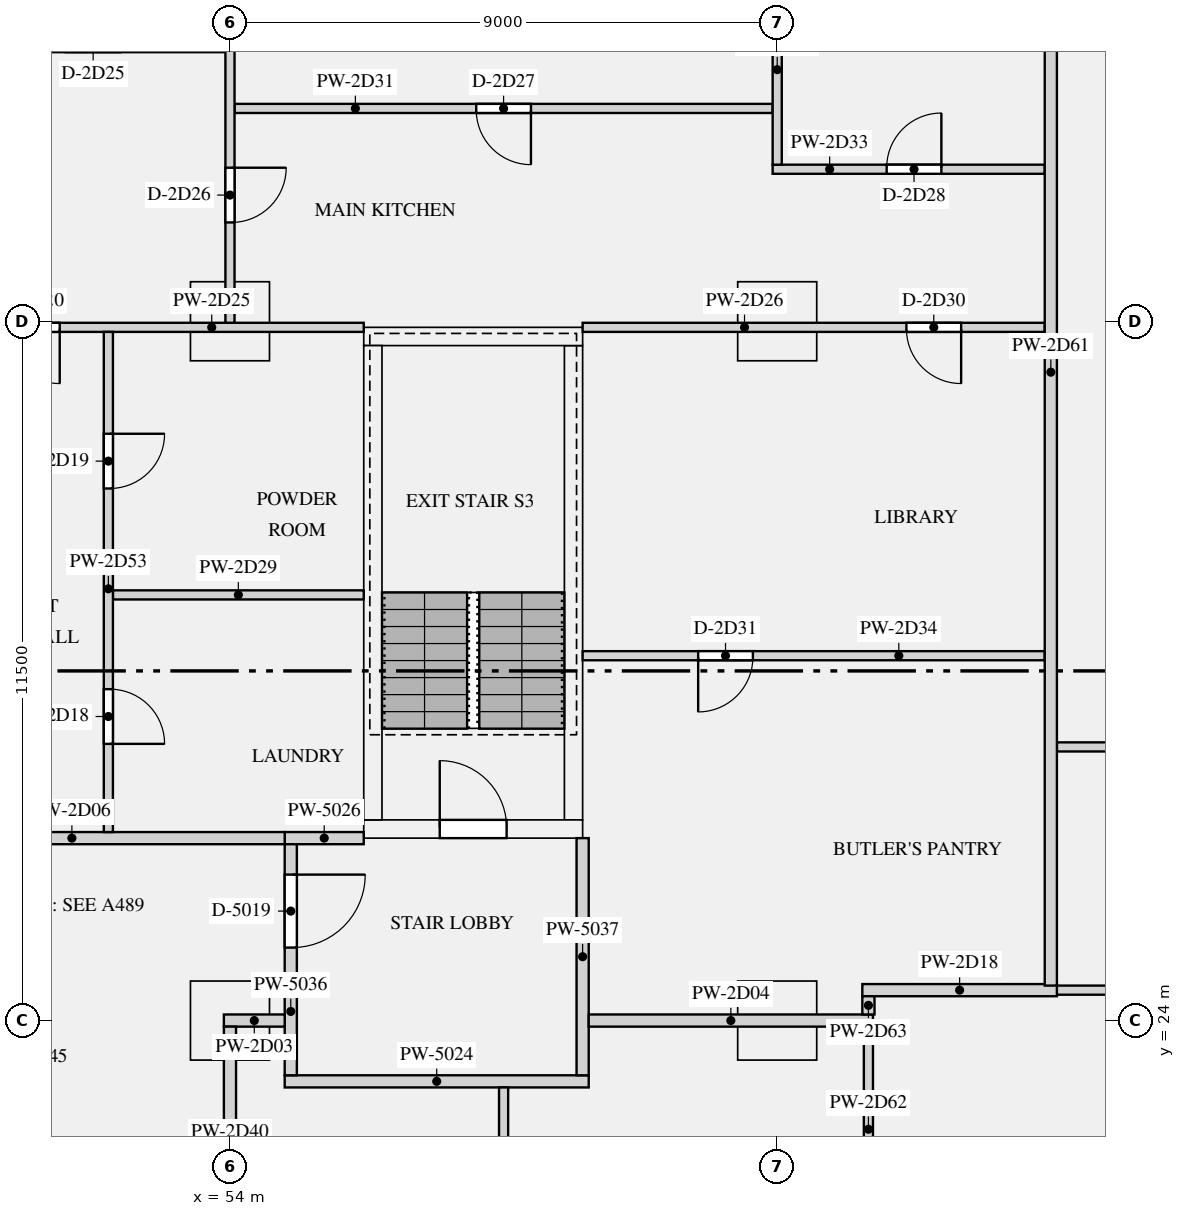
"""IFC4 building model, lengths in metres.
Left out: names, types, materials, properties, quantities, classifications, styles, units other than length and angle.
Written with IfcOpenShell. Run it as: python <this file> out.ifc"""

import sys

from ifc_helpers import new_model, si_unit, direction, frame, frame_2d, origin, origin_2d, place, context, subcontext, project, spatial, rectangle, extrude, element, fill, save


model = new_model("IFC4")
c1 = context("Model", 3, precision=1e-05, world=origin(), true_north=direction((0.0, 1.0)))
c2 = subcontext(c1, "Body", "Model", "MODEL_VIEW")
j1 = project(units=[si_unit("LENGTHUNIT", "METRE"), si_unit("PLANEANGLEUNIT", "RADIAN")], contexts=[c1])
p1 = place(None, origin())
s1 = spatial("IfcSite", under=j1, at=p1, CompositionType="ELEMENT")
p2 = place(p1, origin())
s2 = spatial("IfcBuilding", under=s1, at=p2, CompositionType="ELEMENT")
p3 = place(p2, frame((0.0, 0.0, 111.9)))
s3 = spatial("IfcBuildingStorey", under=s2, at=p3, CompositionType="ELEMENT", Elevation=111.9)
for number, where, z_axis, x_axis in (
    (1, (54.0, 24.0, 0.0), (0.0, 0.0, 1.0), (1.0, 0.0, 0.0)),
    (2, (63.0, 24.0, 0.0), (0.0, 0.0, 1.0), (1.0, 0.0, 0.0)),
    (3, (54.0, 35.5, 0.0), (0.0, 0.0, 1.0), (1.0, 0.0, 0.0)),
    (4, (63.0, 35.5, 0.0), (0.0, 0.0, 1.0), (1.0, 0.0, 0.0)),
):
    element("IfcColumn", number, at=place(p3, frame(where, z_axis=z_axis, x_axis=x_axis)), inside=s3, PredefinedType="COLUMN", context=c2, shape_type="SweptSolid", body=[
        extrude(rectangle(XDim=1.3, YDim=1.3, at=origin_2d()), origin(), (0.0, 0.0, 1.0), 3.15),
    ])
p4 = place(p3, frame((56.2, 27.15, 0.0), z_axis=(0.0, 0.0, 1.0), x_axis=(1.0, 0.0, 0.0)))
e5 = element("IfcWall", 5, at=p4, inside=s3, PredefinedType="SHEAR", context=c2, shape_type="SweptSolid", body=[
    extrude(rectangle(XDim=3.6, YDim=0.3, at=frame_2d((1.8, 0.0))), origin(), (0.0, 0.0, 1.0), 3.15),
])
p5 = place(p4, frame((1.25, 0.0, 0.0)))
e6 = element("IfcOpeningElement", 6, at=p5, cuts=e5, PredefinedType="OPENING", context=c2, shape_type="SweptSolid", body=[
    extrude(rectangle(XDim=1.1, YDim=2.1, at=frame_2d((0.55, 1.05))), frame((0.0, 0.16, 0.0), z_axis=(0.0, -1.0, 0.0), x_axis=(1.0, 0.0, 0.0)), (0.0, 0.0, 1.0), 0.32),
])
p6 = place(p3, frame((56.2, 35.25, 0.0), z_axis=(0.0, 0.0, 1.0), x_axis=(1.0, 0.0, 0.0)))
e7 = element("IfcWall", 7, at=p6, inside=s3, PredefinedType="SHEAR", context=c2, shape_type="SweptSolid", body=[
    extrude(rectangle(XDim=3.6, YDim=0.3, at=frame_2d((1.8, 0.0))), origin(), (0.0, 0.0, 1.0), 3.15),
])
for number, where, z_axis, x_axis in (
    (8, (56.35, 27.3, 0.0), (0.0, 0.0, 1.0), (0.0, 1.0, 0.0)),
    (9, (59.65, 27.3, 0.0), (0.0, 0.0, 1.0), (0.0, 1.0, 0.0)),
):
    element("IfcWall", number, at=place(p3, frame(where, z_axis=z_axis, x_axis=x_axis)), inside=s3, PredefinedType="SHEAR", context=c2, shape_type="SweptSolid", body=[
        extrude(rectangle(XDim=7.8, YDim=0.3, at=frame_2d((3.9, 0.0))), origin(), (0.0, 0.0, 1.0), 3.15),
    ])
p7 = place(p3, frame((54.9, 23.0, 0.0), z_axis=(0.0, 0.0, 1.0), x_axis=(1.0, 0.0, 0.0)))
e10 = element("IfcWall", 10, at=p7, inside=s3, PredefinedType="PARTITIONING", context=c2, shape_type="SweptSolid", body=[
    extrude(rectangle(XDim=5.0, YDim=0.2, at=frame_2d((2.5, 0.0))), origin(), (0.0, 0.0, 1.0), 2.83),
])
p8 = place(p3, frame((54.9, 27.0, 0.0), z_axis=(0.0, 0.0, 1.0), x_axis=(1.0, 0.0, 0.0)))
e11 = element("IfcWall", 11, at=p8, inside=s3, PredefinedType="PARTITIONING", context=c2, shape_type="SweptSolid", body=[
    extrude(rectangle(XDim=1.3, YDim=0.2, at=frame_2d((0.65, 0.0))), origin(), (0.0, 0.0, 1.0), 2.83),
])
p9 = place(p3, frame((55.0, 23.1, 0.0), z_axis=(0.0, 0.0, 1.0), x_axis=(0.0, 1.0, 0.0)))
e12 = element("IfcWall", 12, at=p9, inside=s3, PredefinedType="PARTITIONING", context=c2, shape_type="SweptSolid", body=[
    extrude(rectangle(XDim=3.8, YDim=0.2, at=frame_2d((1.9, 0.0))), origin(), (0.0, 0.0, 1.0), 2.83),
])
p10 = place(p9, frame((2.1, 0.0, 0.0)))
e13 = element("IfcOpeningElement", 13, at=p10, cuts=e12, PredefinedType="OPENING", context=c2, shape_type="SweptSolid", body=[
    extrude(rectangle(XDim=1.2, YDim=2.1, at=frame_2d((0.6, 1.05))), frame((0.0, 0.11, 0.0), z_axis=(0.0, -1.0, 0.0), x_axis=(1.0, 0.0, 0.0)), (0.0, 0.0, 1.0), 0.22),
])
p11 = place(p3, frame((59.8, 23.1, 0.0), z_axis=(0.0, 0.0, 1.0), x_axis=(0.0, 1.0, 0.0)))
e14 = element("IfcWall", 14, at=p11, inside=s3, PredefinedType="PARTITIONING", context=c2, shape_type="SweptSolid", body=[
    extrude(rectangle(XDim=3.9, YDim=0.2, at=frame_2d((1.95, 0.0))), origin(), (0.0, 0.0, 1.0), 2.83),
])
p12 = place(p3, frame((53.9, 24.0, 0.0), z_axis=(0.0, 0.0, 1.0), x_axis=(1.0, 0.0, 0.0)))
e15 = element("IfcWall", 15, at=p12, inside=s3, PredefinedType="PARTITIONING", context=c2, shape_type="SweptSolid", body=[
    extrude(rectangle(XDim=1.0, YDim=0.2, at=frame_2d((0.5, 0.0))), origin(), (0.0, 0.0, 1.0), 2.83),
])
p13 = place(p3, frame((59.9, 24.0, 0.0), z_axis=(0.0, 0.0, 1.0), x_axis=(1.0, 0.0, 0.0)))
e16 = element("IfcWall", 16, at=p13, inside=s3, PredefinedType="PARTITIONING", context=c2, shape_type="SweptSolid", body=[
    extrude(rectangle(XDim=4.675, YDim=0.2, at=frame_2d((2.337, 0.0))), origin(), (0.0, 0.0, 1.0), 2.83),
])
p14 = place(p3, frame((47.9, 27.0, 0.0), z_axis=(0.0, 0.0, 1.0), x_axis=(1.0, 0.0, 0.0)))
e17 = element("IfcWall", 17, at=p14, inside=s3, PredefinedType="PARTITIONING", context=c2, shape_type="SweptSolid", body=[
    extrude(rectangle(XDim=7.0, YDim=0.2, at=frame_2d((3.5, 0.0))), origin(), (0.0, 0.0, 1.0), 2.83),
])
p15 = place(p3, frame((67.4, 24.5, 0.0), z_axis=(0.0, 0.0, 1.0), x_axis=(1.0, 0.0, 0.0)))
e18 = element("IfcWall", 18, at=p15, inside=s3, PredefinedType="PARTITIONING", context=c2, shape_type="SweptSolid", body=[
    extrude(rectangle(XDim=5.85, YDim=0.15, at=frame_2d((2.925, 0.0))), origin(), (0.0, 0.0, 1.0), 2.83),
])
p16 = place(p15, frame((1.275, 0.0, 0.0)))
e19 = element("IfcOpeningElement", 19, at=p16, cuts=e18, PredefinedType="OPENING", context=c2, shape_type="SweptSolid", body=[
    extrude(rectangle(XDim=1.5, YDim=2.1, at=frame_2d((0.75, 1.05))), frame((0.0, 0.085, 0.0), z_axis=(0.0, -1.0, 0.0), x_axis=(1.0, 0.0, 0.0)), (0.0, 0.0, 1.0), 0.17),
])
p17 = place(p3, frame((64.4, 24.5, 0.0), z_axis=(0.0, 0.0, 1.0), x_axis=(1.0, 0.0, 0.0)))
e20 = element("IfcWall", 20, at=p17, inside=s3, PredefinedType="PARTITIONING", context=c2, shape_type="SweptSolid", body=[
    extrude(rectangle(XDim=3.2, YDim=0.2, at=frame_2d((1.6, 0.0))), origin(), (0.0, 0.0, 1.0), 2.83),
])
p18 = place(p3, frame((67.6, 28.5, 0.0), z_axis=(0.0, 0.0, 1.0), x_axis=(1.0, 0.0, 0.0)))
e21 = element("IfcWall", 21, at=p18, inside=s3, PredefinedType="PARTITIONING", context=c2, shape_type="SweptSolid", body=[
    extrude(rectangle(XDim=5.65, YDim=0.15, at=frame_2d((2.825, 0.0))), origin(), (0.0, 0.0, 1.0), 2.83),
])
p19 = place(p18, frame((1.7, 0.0, 0.0)))
e22 = element("IfcOpeningElement", 22, at=p19, cuts=e21, PredefinedType="OPENING", context=c2, shape_type="SweptSolid", body=[
    extrude(rectangle(XDim=0.9, YDim=2.1, at=frame_2d((0.45, 1.05))), frame((0.0, 0.085, 0.0), z_axis=(0.0, -1.0, 0.0), x_axis=(1.0, 0.0, 0.0)), (0.0, 0.0, 1.0), 0.17),
])
p20 = place(p3, frame((48.1, 35.4, 0.0), z_axis=(0.0, 0.0, 1.0), x_axis=(1.0, 0.0, 0.0)))
e23 = element("IfcWall", 23, at=p20, inside=s3, PredefinedType="PARTITIONING", context=c2, shape_type="SweptSolid", body=[
    extrude(rectangle(XDim=8.1, YDim=0.15, at=frame_2d((4.05, 0.0))), origin(), (0.0, 0.0, 1.0), 2.83),
])
p21 = place(p20, frame((2.2, 0.0, 0.0)))
e24 = element("IfcOpeningElement", 24, at=p21, cuts=e23, PredefinedType="OPENING", context=c2, shape_type="SweptSolid", body=[
    extrude(rectangle(XDim=0.9, YDim=2.1, at=frame_2d((0.45, 1.05))), frame((0.0, 0.085, 0.0), z_axis=(0.0, -1.0, 0.0), x_axis=(1.0, 0.0, 0.0)), (0.0, 0.0, 1.0), 0.17),
])
p22 = place(p3, frame((59.8, 35.4, 0.0), z_axis=(0.0, 0.0, 1.0), x_axis=(1.0, 0.0, 0.0)))
e25 = element("IfcWall", 25, at=p22, inside=s3, PredefinedType="PARTITIONING", context=c2, shape_type="SweptSolid", body=[
    extrude(rectangle(XDim=7.6, YDim=0.15, at=frame_2d((3.8, 0.0))), origin(), (0.0, 0.0, 1.0), 2.83),
])
p23 = place(p22, frame((5.325, 0.0, 0.0)))
e26 = element("IfcOpeningElement", 26, at=p23, cuts=e25, PredefinedType="OPENING", context=c2, shape_type="SweptSolid", body=[
    extrude(rectangle(XDim=0.9, YDim=2.1, at=frame_2d((0.45, 1.05))), frame((0.0, 0.085, 0.0), z_axis=(0.0, -1.0, 0.0), x_axis=(1.0, 0.0, 0.0)), (0.0, 0.0, 1.0), 0.17),
])
p24 = place(p3, frame((52.075, 31.0, 0.0), z_axis=(0.0, 0.0, 1.0), x_axis=(1.0, 0.0, 0.0)))
e27 = element("IfcWall", 27, at=p24, inside=s3, PredefinedType="PARTITIONING", context=c2, shape_type="SweptSolid", body=[
    extrude(rectangle(XDim=4.125, YDim=0.15, at=frame_2d((2.062, 0.0))), origin(), (0.0, 0.0, 1.0), 2.83),
])
p25 = place(p3, frame((54.075, 39.0, 0.0), z_axis=(0.0, 0.0, 1.0), x_axis=(1.0, 0.0, 0.0)))
e28 = element("IfcWall", 28, at=p25, inside=s3, PredefinedType="PARTITIONING", context=c2, shape_type="SweptSolid", body=[
    extrude(rectangle(XDim=8.85, YDim=0.15, at=frame_2d((4.425, 0.0))), origin(), (0.0, 0.0, 1.0), 2.83),
])
p26 = place(p25, frame((3.975, 0.0, 0.0)))
e29 = element("IfcOpeningElement", 29, at=p26, cuts=e28, PredefinedType="OPENING", context=c2, shape_type="SweptSolid", body=[
    extrude(rectangle(XDim=0.9, YDim=2.1, at=frame_2d((0.45, 1.05))), frame((0.0, 0.085, 0.0), z_axis=(0.0, -1.0, 0.0), x_axis=(1.0, 0.0, 0.0)), (0.0, 0.0, 1.0), 0.17),
])
p27 = place(p3, frame((62.925, 38.0, 0.0), z_axis=(0.0, 0.0, 1.0), x_axis=(1.0, 0.0, 0.0)))
e30 = element("IfcWall", 30, at=p27, inside=s3, PredefinedType="PARTITIONING", context=c2, shape_type="SweptSolid", body=[
    extrude(rectangle(XDim=4.475, YDim=0.15, at=frame_2d((2.237, 0.0))), origin(), (0.0, 0.0, 1.0), 2.83),
])
p28 = place(p27, frame((1.875, 0.0, 0.0)))
e31 = element("IfcOpeningElement", 31, at=p28, cuts=e30, PredefinedType="OPENING", context=c2, shape_type="SweptSolid", body=[
    extrude(rectangle(XDim=0.9, YDim=2.1, at=frame_2d((0.45, 1.05))), frame((0.0, 0.085, 0.0), z_axis=(0.0, -1.0, 0.0), x_axis=(1.0, 0.0, 0.0)), (0.0, 0.0, 1.0), 0.17),
])
p29 = place(p3, frame((59.8, 30.0, 0.0), z_axis=(0.0, 0.0, 1.0), x_axis=(1.0, 0.0, 0.0)))
e32 = element("IfcWall", 32, at=p29, inside=s3, PredefinedType="PARTITIONING", context=c2, shape_type="SweptSolid", body=[
    extrude(rectangle(XDim=7.6, YDim=0.15, at=frame_2d((3.8, 0.0))), origin(), (0.0, 0.0, 1.0), 2.83),
])
p30 = place(p29, frame((1.9, 0.0, 0.0)))
e33 = element("IfcOpeningElement", 33, at=p30, cuts=e32, PredefinedType="OPENING", context=c2, shape_type="SweptSolid", body=[
    extrude(rectangle(XDim=0.9, YDim=2.1, at=frame_2d((0.45, 1.05))), frame((0.0, 0.085, 0.0), z_axis=(0.0, -1.0, 0.0), x_axis=(1.0, 0.0, 0.0)), (0.0, 0.0, 1.0), 0.17),
])
p31 = place(p3, frame((54.0, 35.475, 0.0), z_axis=(0.0, 0.0, 1.0), x_axis=(0.0, 1.0, 0.0)))
e34 = element("IfcWall", 34, at=p31, inside=s3, PredefinedType="PARTITIONING", context=c2, shape_type="SweptSolid", body=[
    extrude(rectangle(XDim=9.275, YDim=0.15, at=frame_2d((4.637, 0.0))), origin(), (0.0, 0.0, 1.0), 2.83),
])
p32 = place(p31, frame((1.65, 0.0, 0.0)))
e35 = element("IfcOpeningElement", 35, at=p32, cuts=e34, PredefinedType="OPENING", context=c2, shape_type="SweptSolid", body=[
    extrude(rectangle(XDim=0.9, YDim=2.1, at=frame_2d((0.45, 1.05))), frame((0.0, 0.085, 0.0), z_axis=(0.0, -1.0, 0.0), x_axis=(1.0, 0.0, 0.0)), (0.0, 0.0, 1.0), 0.17),
])
p33 = place(p3, frame((54.0, 16.1, 0.0), z_axis=(0.0, 0.0, 1.0), x_axis=(0.0, 1.0, 0.0)))
e36 = element("IfcWall", 36, at=p33, inside=s3, PredefinedType="PARTITIONING", context=c2, shape_type="SweptSolid", body=[
    extrude(rectangle(XDim=7.8, YDim=0.2, at=frame_2d((3.9, 0.0))), origin(), (0.0, 0.0, 1.0), 2.83),
])
p34 = place(p33, frame((2.35, 0.0, 0.0)))
e37 = element("IfcOpeningElement", 37, at=p34, cuts=e36, PredefinedType="OPENING", context=c2, shape_type="SweptSolid", body=[
    extrude(rectangle(XDim=1.1, YDim=2.1, at=frame_2d((0.55, 1.05))), frame((0.0, 0.11, 0.0), z_axis=(0.0, -1.0, 0.0), x_axis=(1.0, 0.0, 0.0)), (0.0, 0.0, 1.0), 0.22),
])
p35 = place(p3, frame((52.0, 27.1, 0.0), z_axis=(0.0, 0.0, 1.0), x_axis=(0.0, 1.0, 0.0)))
e38 = element("IfcWall", 38, at=p35, inside=s3, PredefinedType="PARTITIONING", context=c2, shape_type="SweptSolid", body=[
    extrude(rectangle(XDim=8.225, YDim=0.15, at=frame_2d((4.112, 0.0))), origin(), (0.0, 0.0, 1.0), 2.83),
])
p36 = place(p35, frame((1.45, 0.0, 0.0)))
e39 = element("IfcOpeningElement", 39, at=p36, cuts=e38, PredefinedType="OPENING", context=c2, shape_type="SweptSolid", body=[
    extrude(rectangle(XDim=0.9, YDim=2.1, at=frame_2d((0.45, 1.05))), frame((0.0, 0.085, 0.0), z_axis=(0.0, -1.0, 0.0), x_axis=(1.0, 0.0, 0.0)), (0.0, 0.0, 1.0), 0.17),
])
p37 = place(p35, frame((5.65, 0.0, 0.0)))
e40 = element("IfcOpeningElement", 40, at=p37, cuts=e38, PredefinedType="OPENING", context=c2, shape_type="SweptSolid", body=[
    extrude(rectangle(XDim=0.9, YDim=2.1, at=frame_2d((0.45, 1.05))), frame((0.0, 0.085, 0.0), z_axis=(0.0, -1.0, 0.0), x_axis=(1.0, 0.0, 0.0)), (0.0, 0.0, 1.0), 0.17),
])
p38 = place(p3, frame((63.0, 38.075, 0.0), z_axis=(0.0, 0.0, 1.0), x_axis=(0.0, 1.0, 0.0)))
e41 = element("IfcWall", 41, at=p38, inside=s3, PredefinedType="PARTITIONING", context=c2, shape_type="SweptSolid", body=[
    extrude(rectangle(XDim=6.675, YDim=0.15, at=frame_2d((3.337, 0.0))), origin(), (0.0, 0.0, 1.0), 2.83),
])
p39 = place(p38, frame((3.125, 0.0, 0.0)))
e42 = element("IfcOpeningElement", 42, at=p39, cuts=e41, PredefinedType="OPENING", context=c2, shape_type="SweptSolid", body=[
    extrude(rectangle(XDim=1.5, YDim=2.1, at=frame_2d((0.75, 1.05))), frame((0.0, 0.085, 0.0), z_axis=(0.0, -1.0, 0.0), x_axis=(1.0, 0.0, 0.0)), (0.0, 0.0, 1.0), 0.17),
])
p40 = place(p3, frame((67.5, 24.575, 0.0), z_axis=(0.0, 0.0, 1.0), x_axis=(0.0, 1.0, 0.0)))
e43 = element("IfcWall", 43, at=p40, inside=s3, PredefinedType="PARTITIONING", context=c2, shape_type="SweptSolid", body=[
    extrude(rectangle(XDim=20.175, YDim=0.2, at=frame_2d((10.087, 0.0))), origin(), (0.0, 0.0, 1.0), 2.83),
])
p41 = place(p3, frame((64.5, 16.575, 0.0), z_axis=(0.0, 0.0, 1.0), x_axis=(0.0, 1.0, 0.0)))
e44 = element("IfcWall", 44, at=p41, inside=s3, PredefinedType="PARTITIONING", context=c2, shape_type="SweptSolid", body=[
    extrude(rectangle(XDim=7.325, YDim=0.15, at=frame_2d((3.663, 0.0))), origin(), (0.0, 0.0, 1.0), 2.83),
])
p42 = place(p41, frame((3.05, 0.0, 0.0)))
e45 = element("IfcOpeningElement", 45, at=p42, cuts=e44, PredefinedType="OPENING", context=c2, shape_type="SweptSolid", body=[
    extrude(rectangle(XDim=0.9, YDim=2.1, at=frame_2d((0.45, 1.05))), frame((0.0, 0.085, 0.0), z_axis=(0.0, -1.0, 0.0), x_axis=(1.0, 0.0, 0.0)), (0.0, 0.0, 1.0), 0.17),
])
p43 = place(p3, frame((64.5, 24.1, 0.0), z_axis=(0.0, 0.0, 1.0), x_axis=(0.0, 1.0, 0.0)))
e46 = element("IfcWall", 46, at=p43, inside=s3, PredefinedType="PARTITIONING", context=c2, shape_type="SweptSolid", body=[
    extrude(rectangle(XDim=0.3, YDim=0.2, at=frame_2d((0.15, 0.0))), origin(), (0.0, 0.0, 1.0), 2.83),
])
p44 = place(p3, frame((58.5, 16.575, 0.0), z_axis=(0.0, 0.0, 1.0), x_axis=(0.0, 1.0, 0.0)))
e47 = element("IfcWall", 47, at=p44, inside=s3, PredefinedType="PARTITIONING", context=c2, shape_type="SweptSolid", body=[
    extrude(rectangle(XDim=6.325, YDim=0.15, at=frame_2d((3.163, 0.0))), origin(), (0.0, 0.0, 1.0), 2.83),
])
p45 = place(p44, frame((2.75, 0.0, 0.0)))
e48 = element("IfcOpeningElement", 48, at=p45, cuts=e47, PredefinedType="OPENING", context=c2, shape_type="SweptSolid", body=[
    extrude(rectangle(XDim=0.9, YDim=2.1, at=frame_2d((0.45, 1.05))), frame((0.0, 0.085, 0.0), z_axis=(0.0, -1.0, 0.0), x_axis=(1.0, 0.0, 0.0)), (0.0, 0.0, 1.0), 0.17),
])
p46 = place(p5, origin())
e49 = element("IfcDoor", 49, at=p46, inside=s3, OperationType="SINGLE_SWING_LEFT", PredefinedType="DOOR", context=c2, shape_type="SweptSolid", body=[
    extrude(rectangle(XDim=1.1, YDim=2.1, at=frame_2d((0.55, 1.05))), frame((0.0, 0.025, 0.0), z_axis=(0.0, -1.0, 0.0), x_axis=(1.0, 0.0, 0.0)), (0.0, 0.0, 1.0), 0.05),
])
fill(e6, e49)
p47 = place(p10, frame((1.2, 0.0, 0.0), z_axis=(0.0, 0.0, 1.0), x_axis=(-1.0, 0.0, 0.0)))
e50 = element("IfcDoor", 50, at=p47, inside=s3, OperationType="SINGLE_SWING_LEFT", PredefinedType="DOOR", context=c2, shape_type="SweptSolid", body=[
    extrude(rectangle(XDim=1.2, YDim=2.1, at=frame_2d((0.6, 1.05))), frame((0.0, 0.025, 0.0), z_axis=(0.0, -1.0, 0.0), x_axis=(1.0, 0.0, 0.0)), (0.0, 0.0, 1.0), 0.05),
])
fill(e13, e50)
p48 = place(p36, frame((0.9, 0.0, 0.0), z_axis=(0.0, 0.0, 1.0), x_axis=(-1.0, 0.0, 0.0)))
e51 = element("IfcDoor", 51, at=p48, inside=s3, OperationType="SINGLE_SWING_RIGHT", PredefinedType="DOOR", context=c2, shape_type="SweptSolid", body=[
    extrude(rectangle(XDim=0.9, YDim=2.1, at=frame_2d((0.45, 1.05))), frame((0.0, 0.025, 0.0), z_axis=(0.0, -1.0, 0.0), x_axis=(1.0, 0.0, 0.0)), (0.0, 0.0, 1.0), 0.05),
])
fill(e39, e51)
p49 = place(p37, frame((0.9, 0.0, 0.0), z_axis=(0.0, 0.0, 1.0), x_axis=(-1.0, 0.0, 0.0)))
e52 = element("IfcDoor", 52, at=p49, inside=s3, OperationType="SINGLE_SWING_LEFT", PredefinedType="DOOR", context=c2, shape_type="SweptSolid", body=[
    extrude(rectangle(XDim=0.9, YDim=2.1, at=frame_2d((0.45, 1.05))), frame((0.0, 0.025, 0.0), z_axis=(0.0, -1.0, 0.0), x_axis=(1.0, 0.0, 0.0)), (0.0, 0.0, 1.0), 0.05),
])
fill(e40, e52)
p50 = place(p21, frame((0.9, 0.0, 0.0), z_axis=(0.0, 0.0, 1.0), x_axis=(-1.0, 0.0, 0.0)))
e53 = element("IfcDoor", 53, at=p50, inside=s3, OperationType="SINGLE_SWING_LEFT", PredefinedType="DOOR", context=c2, shape_type="SweptSolid", body=[
    extrude(rectangle(XDim=0.9, YDim=2.1, at=frame_2d((0.45, 1.05))), frame((0.0, 0.025, 0.0), z_axis=(0.0, -1.0, 0.0), x_axis=(1.0, 0.0, 0.0)), (0.0, 0.0, 1.0), 0.05),
])
fill(e24, e53)
p51 = place(p32, frame((0.9, 0.0, 0.0), z_axis=(0.0, 0.0, 1.0), x_axis=(-1.0, 0.0, 0.0)))
e54 = element("IfcDoor", 54, at=p51, inside=s3, OperationType="SINGLE_SWING_LEFT", PredefinedType="DOOR", context=c2, shape_type="SweptSolid", body=[
    extrude(rectangle(XDim=0.9, YDim=2.1, at=frame_2d((0.45, 1.05))), frame((0.0, 0.025, 0.0), z_axis=(0.0, -1.0, 0.0), x_axis=(1.0, 0.0, 0.0)), (0.0, 0.0, 1.0), 0.05),
])
fill(e35, e54)
p52 = place(p26, frame((0.9, 0.0, 0.0), z_axis=(0.0, 0.0, 1.0), x_axis=(-1.0, 0.0, 0.0)))
e55 = element("IfcDoor", 55, at=p52, inside=s3, OperationType="SINGLE_SWING_LEFT", PredefinedType="DOOR", context=c2, shape_type="SweptSolid", body=[
    extrude(rectangle(XDim=0.9, YDim=2.1, at=frame_2d((0.45, 1.05))), frame((0.0, 0.025, 0.0), z_axis=(0.0, -1.0, 0.0), x_axis=(1.0, 0.0, 0.0)), (0.0, 0.0, 1.0), 0.05),
])
fill(e29, e55)
p53 = place(p28, origin())
e56 = element("IfcDoor", 56, at=p53, inside=s3, OperationType="SINGLE_SWING_RIGHT", PredefinedType="DOOR", context=c2, shape_type="SweptSolid", body=[
    extrude(rectangle(XDim=0.9, YDim=2.1, at=frame_2d((0.45, 1.05))), frame((0.0, 0.025, 0.0), z_axis=(0.0, -1.0, 0.0), x_axis=(1.0, 0.0, 0.0)), (0.0, 0.0, 1.0), 0.05),
])
fill(e31, e56)
p54 = place(p23, frame((0.9, 0.0, 0.0), z_axis=(0.0, 0.0, 1.0), x_axis=(-1.0, 0.0, 0.0)))
e57 = element("IfcDoor", 57, at=p54, inside=s3, OperationType="SINGLE_SWING_LEFT", PredefinedType="DOOR", context=c2, shape_type="SweptSolid", body=[
    extrude(rectangle(XDim=0.9, YDim=2.1, at=frame_2d((0.45, 1.05))), frame((0.0, 0.025, 0.0), z_axis=(0.0, -1.0, 0.0), x_axis=(1.0, 0.0, 0.0)), (0.0, 0.0, 1.0), 0.05),
])
fill(e26, e57)
p55 = place(p30, frame((0.9, 0.0, 0.0), z_axis=(0.0, 0.0, 1.0), x_axis=(-1.0, 0.0, 0.0)))
e58 = element("IfcDoor", 58, at=p55, inside=s3, OperationType="SINGLE_SWING_RIGHT", PredefinedType="DOOR", context=c2, shape_type="SweptSolid", body=[
    extrude(rectangle(XDim=0.9, YDim=2.1, at=frame_2d((0.45, 1.05))), frame((0.0, 0.025, 0.0), z_axis=(0.0, -1.0, 0.0), x_axis=(1.0, 0.0, 0.0)), (0.0, 0.0, 1.0), 0.05),
])
fill(e33, e58)
save(model, sys.argv[1])
